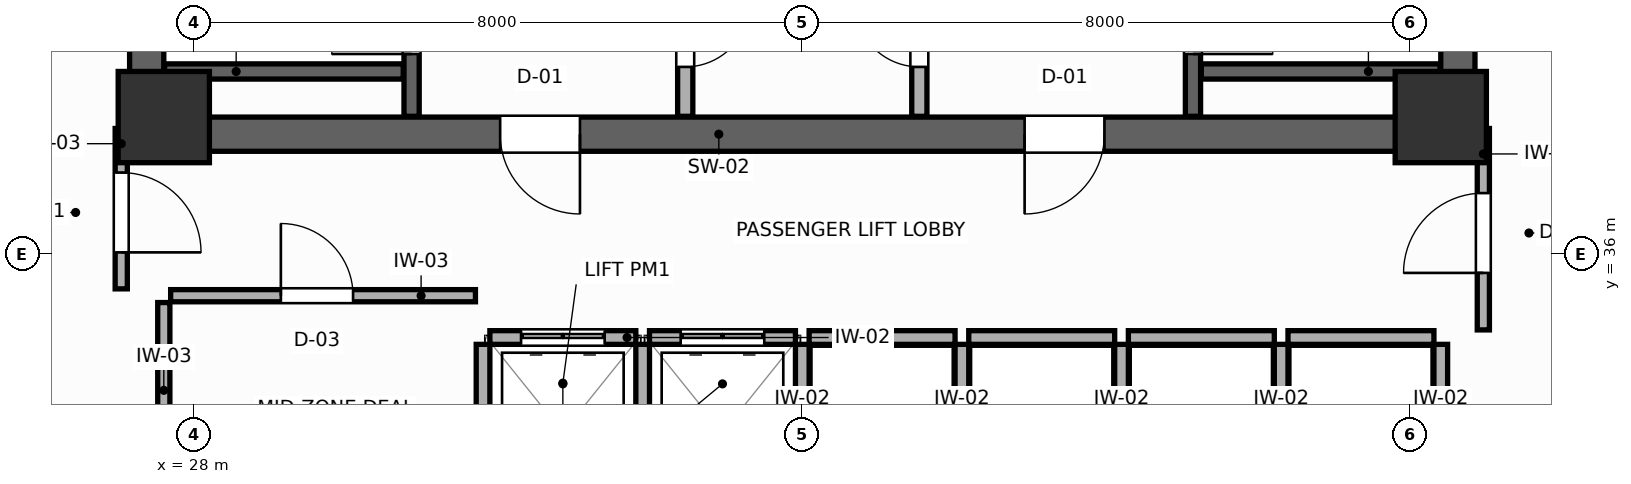
"""IFC4 building model, lengths in metres.
Left out: names, types, materials, properties, quantities, classifications, styles, units other than length and angle.
Written with IfcOpenShell. Run it as: python <this file> out.ifc"""

import sys

from ifc_helpers import new_model, si_unit, direction, frame, frame_2d, origin, origin_2d, place, context, subcontext, project, spatial, rectangle, extrude, source, transform, mapped, element, fill, save


model = new_model("IFC4")
c1 = context("Model", 3, precision=1e-05, world=origin(), true_north=direction((0.0, 1.0)))
c2 = subcontext(c1, "Body", "Model", "MODEL_VIEW")
j1 = project(units=[si_unit("LENGTHUNIT", "METRE"), si_unit("PLANEANGLEUNIT", "RADIAN")], contexts=[c1])
p1 = place(None, origin())
s1 = spatial("IfcSite", under=j1, at=p1, CompositionType="ELEMENT")
p2 = place(p1, origin())
s2 = spatial("IfcBuilding", under=s1, at=p2, CompositionType="ELEMENT")
p3 = place(p2, frame((0.0, 0.0, 136.2)))
s3 = spatial("IfcBuildingStorey", under=s2, at=p3, CompositionType="ELEMENT", Elevation=136.2)
p4 = place(p3, frame((27.15, 37.575, 0.0), z_axis=(0.0, 0.0, 1.0), x_axis=(1.0, 0.0, 0.0)))
e1 = element("IfcWall", 1, at=p4, inside=s3, PredefinedType="SHEAR", context=c2, shape_type="SweptSolid", body=[
    extrude(rectangle(XDim=17.7, YDim=0.45, at=frame_2d((8.85, 0.0))), origin(), (0.0, 0.0, 1.0), 3.6),
])
p5 = place(p4, frame((4.875, 0.0, 0.0)))
e2 = element("IfcOpeningElement", 2, at=p5, cuts=e1, PredefinedType="OPENING", context=c2, shape_type="SweptSolid", body=[
    extrude(rectangle(XDim=1.05, YDim=2.1, at=frame_2d((0.525, 1.05))), frame((0.0, 0.235, 0.0), z_axis=(0.0, -1.0, 0.0), x_axis=(1.0, 0.0, 0.0)), (0.0, 0.0, 1.0), 0.47),
])
p6 = place(p4, frame((11.775, 0.0, 0.0)))
e3 = element("IfcOpeningElement", 3, at=p6, cuts=e1, PredefinedType="OPENING", context=c2, shape_type="SweptSolid", body=[
    extrude(rectangle(XDim=1.05, YDim=2.1, at=frame_2d((0.525, 1.05))), frame((0.0, 0.235, 0.0), z_axis=(0.0, -1.0, 0.0), x_axis=(1.0, 0.0, 0.0)), (0.0, 0.0, 1.0), 0.47),
])
for number, where, z_axis, x_axis in (
    (4, (27.375, 37.8, 0.0), (0.0, 0.0, 1.0), (0.0, 1.0, 0.0)),
    (5, (44.625, 37.8, 0.0), (0.0, 0.0, 1.0), (0.0, 1.0, 0.0)),
):
    element("IfcWall", number, at=place(p3, frame(where, z_axis=z_axis, x_axis=x_axis)), inside=s3, PredefinedType="SHEAR", context=c2, shape_type="SweptSolid", body=[
        extrude(rectangle(XDim=9.0, YDim=0.45, at=frame_2d((4.5, 0.0))), origin(), (0.0, 0.0, 1.0), 3.6),
    ])
m1 = source(origin(), c2, "Body", "SweptSolid", [
    extrude(rectangle(XDim=1.2, YDim=1.2, at=origin_2d()), origin(), (0.0, 0.0, 1.0), 3.6),
])
for number, where, z_axis, x_axis in (
    (6, (27.6, 37.8, 0.0), (0.0, 0.0, 1.0), (1.0, 0.0, 0.0)),
    (7, (44.4, 37.8, 0.0), (0.0, 0.0, 1.0), (1.0, 0.0, 0.0)),
):
    element("IfcColumn", number, at=place(p3, frame(where, z_axis=z_axis, x_axis=x_axis)), inside=s3, PredefinedType="COLUMN", context=c2, shape_type="MappedRepresentation", body=[
        mapped(m1, transform((0.0, 0.0, 0.0), scale=1.0)),
    ])
p7 = place(p3, frame((30.86, 37.81, 0.0), z_axis=(0.0, 0.0, 1.0), x_axis=(0.0, 1.0, 0.0)))
e8 = element("IfcWall", 8, at=p7, inside=s3, PredefinedType="SHEAR", context=c2, shape_type="SweptSolid", body=[
    extrude(rectangle(XDim=8.98, YDim=0.2, at=frame_2d((4.49, 0.0))), origin(), (0.0, 0.0, 1.0), 3.6),
])
p8 = place(p7, frame((0.82, 0.0, 0.0)))
e9 = element("IfcOpeningElement", 9, at=p8, cuts=e8, PredefinedType="OPENING", context=c2, shape_type="SweptSolid", body=[
    extrude(rectangle(XDim=1.05, YDim=2.1, at=frame_2d((0.525, 1.05))), frame((0.0, 0.11, 0.0), z_axis=(0.0, -1.0, 0.0), x_axis=(1.0, 0.0, 0.0)), (0.0, 0.0, 1.0), 0.22),
])
p9 = place(p3, frame((27.61, 38.4, 0.0), z_axis=(0.0, 0.0, 1.0), x_axis=(1.0, 0.0, 0.0)))
e10 = element("IfcWall", 10, at=p9, inside=s3, PredefinedType="SHEAR", context=c2, shape_type="SweptSolid", body=[
    extrude(rectangle(XDim=3.14, YDim=0.2, at=frame_2d((1.57, 0.0))), origin(), (0.0, 0.0, 1.0), 3.6),
])
p10 = place(p3, frame((41.14, 37.81, 0.0), z_axis=(0.0, 0.0, 1.0), x_axis=(0.0, 1.0, 0.0)))
e11 = element("IfcWall", 11, at=p10, inside=s3, PredefinedType="SHEAR", context=c2, shape_type="SweptSolid", body=[
    extrude(rectangle(XDim=8.98, YDim=0.2, at=frame_2d((4.49, 0.0))), origin(), (0.0, 0.0, 1.0), 3.6),
])
p11 = place(p10, frame((0.82, 0.0, 0.0)))
e12 = element("IfcOpeningElement", 12, at=p11, cuts=e11, PredefinedType="OPENING", context=c2, shape_type="SweptSolid", body=[
    extrude(rectangle(XDim=1.05, YDim=2.1, at=frame_2d((0.525, 1.05))), frame((0.0, 0.11, 0.0), z_axis=(0.0, -1.0, 0.0), x_axis=(1.0, 0.0, 0.0)), (0.0, 0.0, 1.0), 0.22),
])
p12 = place(p3, frame((41.25, 38.4, 0.0), z_axis=(0.0, 0.0, 1.0), x_axis=(1.0, 0.0, 0.0)))
e13 = element("IfcWall", 13, at=p12, inside=s3, PredefinedType="SHEAR", context=c2, shape_type="SweptSolid", body=[
    extrude(rectangle(XDim=3.14, YDim=0.2, at=frame_2d((1.57, 0.0))), origin(), (0.0, 0.0, 1.0), 3.6),
])
p13 = place(p3, frame((34.46, 37.81, 0.0), z_axis=(0.0, 0.0, 1.0), x_axis=(0.0, 1.0, 0.0)))
e14 = element("IfcWall", 14, at=p13, inside=s3, PredefinedType="PARTITIONING", context=c2, shape_type="SweptSolid", body=[
    extrude(rectangle(XDim=8.98, YDim=0.2, at=frame_2d((4.49, 0.0))), origin(), (0.0, 0.0, 1.0), 3.4),
])
p14 = place(p13, frame((0.65, 0.0, 0.0)))
e15 = element("IfcOpeningElement", 15, at=p14, cuts=e14, PredefinedType="OPENING", context=c2, shape_type="SweptSolid", body=[
    extrude(rectangle(XDim=0.85, YDim=2.05, at=frame_2d((0.425, 1.025))), frame((0.0, 0.11, 0.0), z_axis=(0.0, -1.0, 0.0), x_axis=(1.0, 0.0, 0.0)), (0.0, 0.0, 1.0), 0.22),
])
p15 = place(p3, frame((37.54, 37.81, 0.0), z_axis=(0.0, 0.0, 1.0), x_axis=(0.0, 1.0, 0.0)))
e16 = element("IfcWall", 16, at=p15, inside=s3, PredefinedType="PARTITIONING", context=c2, shape_type="SweptSolid", body=[
    extrude(rectangle(XDim=8.98, YDim=0.2, at=frame_2d((4.49, 0.0))), origin(), (0.0, 0.0, 1.0), 3.4),
])
p16 = place(p15, frame((0.65, 0.0, 0.0)))
e17 = element("IfcOpeningElement", 17, at=p16, cuts=e16, PredefinedType="OPENING", context=c2, shape_type="SweptSolid", body=[
    extrude(rectangle(XDim=0.85, YDim=2.05, at=frame_2d((0.425, 1.025))), frame((0.0, 0.11, 0.0), z_axis=(0.0, -1.0, 0.0), x_axis=(1.0, 0.0, 0.0)), (0.0, 0.0, 1.0), 0.22),
])
p17 = place(p3, frame((31.89, 34.9, 0.0), z_axis=(0.0, 0.0, 1.0), x_axis=(1.0, 0.0, 0.0)))
e18 = element("IfcWall", 18, at=p17, inside=s3, PredefinedType="PARTITIONING", context=c2, shape_type="SweptSolid", body=[
    extrude(rectangle(XDim=1.92, YDim=0.18, at=frame_2d((0.96, 0.0))), origin(), (0.0, 0.0, 1.0), 3.4),
])
p18 = place(p17, frame((0.41, 0.0, 0.0)))
e19 = element("IfcOpeningElement", 19, at=p18, cuts=e18, PredefinedType="OPENING", context=c2, shape_type="SweptSolid", body=[
    extrude(rectangle(XDim=1.1, YDim=2.1, at=frame_2d((0.55, 1.05))), frame((0.0, 0.1, 0.0), z_axis=(0.0, -1.0, 0.0), x_axis=(1.0, 0.0, 0.0)), (0.0, 0.0, 1.0), 0.2),
])
p19 = place(p3, frame((31.8, 32.49, 0.0), z_axis=(0.0, 0.0, 1.0), x_axis=(0.0, 1.0, 0.0)))
e20 = element("IfcWall", 20, at=p19, inside=s3, PredefinedType="PARTITIONING", context=c2, shape_type="SweptSolid", body=[
    extrude(rectangle(XDim=2.32, YDim=0.18, at=frame_2d((1.16, 0.0))), origin(), (0.0, 0.0, 1.0), 3.4),
])
p20 = place(p3, frame((33.99, 34.9, 0.0), z_axis=(0.0, 0.0, 1.0), x_axis=(1.0, 0.0, 0.0)))
e21 = element("IfcWall", 21, at=p20, inside=s3, PredefinedType="PARTITIONING", context=c2, shape_type="SweptSolid", body=[
    extrude(rectangle(XDim=1.92, YDim=0.18, at=frame_2d((0.96, 0.0))), origin(), (0.0, 0.0, 1.0), 3.4),
])
p21 = place(p20, frame((0.41, 0.0, 0.0)))
e22 = element("IfcOpeningElement", 22, at=p21, cuts=e21, PredefinedType="OPENING", context=c2, shape_type="SweptSolid", body=[
    extrude(rectangle(XDim=1.1, YDim=2.1, at=frame_2d((0.55, 1.05))), frame((0.0, 0.1, 0.0), z_axis=(0.0, -1.0, 0.0), x_axis=(1.0, 0.0, 0.0)), (0.0, 0.0, 1.0), 0.2),
])
p22 = place(p3, frame((33.9, 32.49, 0.0), z_axis=(0.0, 0.0, 1.0), x_axis=(0.0, 1.0, 0.0)))
e23 = element("IfcWall", 23, at=p22, inside=s3, PredefinedType="PARTITIONING", context=c2, shape_type="SweptSolid", body=[
    extrude(rectangle(XDim=2.32, YDim=0.18, at=frame_2d((1.16, 0.0))), origin(), (0.0, 0.0, 1.0), 3.4),
])
p23 = place(p3, frame((36.09, 34.9, 0.0), z_axis=(0.0, 0.0, 1.0), x_axis=(1.0, 0.0, 0.0)))
e24 = element("IfcWall", 24, at=p23, inside=s3, PredefinedType="PARTITIONING", context=c2, shape_type="SweptSolid", body=[
    extrude(rectangle(XDim=1.92, YDim=0.18, at=frame_2d((0.96, 0.0))), origin(), (0.0, 0.0, 1.0), 3.4),
])
p24 = place(p3, frame((36.0, 32.49, 0.0), z_axis=(0.0, 0.0, 1.0), x_axis=(0.0, 1.0, 0.0)))
e25 = element("IfcWall", 25, at=p24, inside=s3, PredefinedType="PARTITIONING", context=c2, shape_type="SweptSolid", body=[
    extrude(rectangle(XDim=2.32, YDim=0.18, at=frame_2d((1.16, 0.0))), origin(), (0.0, 0.0, 1.0), 3.4),
])
p25 = place(p3, frame((38.19, 34.9, 0.0), z_axis=(0.0, 0.0, 1.0), x_axis=(1.0, 0.0, 0.0)))
e26 = element("IfcWall", 26, at=p25, inside=s3, PredefinedType="PARTITIONING", context=c2, shape_type="SweptSolid", body=[
    extrude(rectangle(XDim=1.92, YDim=0.18, at=frame_2d((0.96, 0.0))), origin(), (0.0, 0.0, 1.0), 3.4),
])
p26 = place(p3, frame((38.1, 32.49, 0.0), z_axis=(0.0, 0.0, 1.0), x_axis=(0.0, 1.0, 0.0)))
e27 = element("IfcWall", 27, at=p26, inside=s3, PredefinedType="PARTITIONING", context=c2, shape_type="SweptSolid", body=[
    extrude(rectangle(XDim=2.32, YDim=0.18, at=frame_2d((1.16, 0.0))), origin(), (0.0, 0.0, 1.0), 3.4),
])
p27 = place(p3, frame((40.29, 34.9, 0.0), z_axis=(0.0, 0.0, 1.0), x_axis=(1.0, 0.0, 0.0)))
e28 = element("IfcWall", 28, at=p27, inside=s3, PredefinedType="PARTITIONING", context=c2, shape_type="SweptSolid", body=[
    extrude(rectangle(XDim=1.92, YDim=0.18, at=frame_2d((0.96, 0.0))), origin(), (0.0, 0.0, 1.0), 3.4),
])
p28 = place(p3, frame((40.2, 32.49, 0.0), z_axis=(0.0, 0.0, 1.0), x_axis=(0.0, 1.0, 0.0)))
e29 = element("IfcWall", 29, at=p28, inside=s3, PredefinedType="PARTITIONING", context=c2, shape_type="SweptSolid", body=[
    extrude(rectangle(XDim=2.32, YDim=0.18, at=frame_2d((1.16, 0.0))), origin(), (0.0, 0.0, 1.0), 3.4),
])
p29 = place(p3, frame((42.39, 34.9, 0.0), z_axis=(0.0, 0.0, 1.0), x_axis=(1.0, 0.0, 0.0)))
e30 = element("IfcWall", 30, at=p29, inside=s3, PredefinedType="PARTITIONING", context=c2, shape_type="SweptSolid", body=[
    extrude(rectangle(XDim=1.92, YDim=0.18, at=frame_2d((0.96, 0.0))), origin(), (0.0, 0.0, 1.0), 3.4),
])
for number, where, z_axis, x_axis in (
    (31, (42.3, 32.49, 0.0), (0.0, 0.0, 1.0), (0.0, 1.0, 0.0)),
    (32, (44.4, 32.49, 0.0), (0.0, 0.0, 1.0), (0.0, 1.0, 0.0)),
):
    element("IfcWall", number, at=place(p3, frame(where, z_axis=z_axis, x_axis=x_axis)), inside=s3, PredefinedType="PARTITIONING", context=c2, shape_type="SweptSolid", body=[
        extrude(rectangle(XDim=2.32, YDim=0.18, at=frame_2d((1.16, 0.0))), origin(), (0.0, 0.0, 1.0), 3.4),
    ])
p30 = place(p3, frame((27.6, 33.05, 0.0), z_axis=(0.0, 0.0, 1.0), x_axis=(0.0, 1.0, 0.0)))
e33 = element("IfcWall", 33, at=p30, inside=s3, PredefinedType="PARTITIONING", context=c2, shape_type="SweptSolid", body=[
    extrude(rectangle(XDim=2.31, YDim=0.16, at=frame_2d((1.155, 0.0))), origin(), (0.0, 0.0, 1.0), 3.4),
])
p31 = place(p3, frame((27.69, 35.45, 0.0), z_axis=(0.0, 0.0, 1.0), x_axis=(1.0, 0.0, 0.0)))
e34 = element("IfcWall", 34, at=p31, inside=s3, PredefinedType="PARTITIONING", context=c2, shape_type="SweptSolid", body=[
    extrude(rectangle(XDim=4.01, YDim=0.16, at=frame_2d((2.005, 0.0))), origin(), (0.0, 0.0, 1.0), 3.4),
])
p32 = place(p31, frame((1.45, 0.0, 0.0)))
e35 = element("IfcOpeningElement", 35, at=p32, cuts=e34, PredefinedType="OPENING", context=c2, shape_type="SweptSolid", body=[
    extrude(rectangle(XDim=0.95, YDim=2.05, at=frame_2d((0.475, 1.025))), frame((0.0, 0.09, 0.0), z_axis=(0.0, -1.0, 0.0), x_axis=(1.0, 0.0, 0.0)), (0.0, 0.0, 1.0), 0.18),
])
p33 = place(p3, frame((27.04, 35.54, 0.0), z_axis=(0.0, 0.0, 1.0), x_axis=(0.0, 1.0, 0.0)))
e36 = element("IfcWall", 36, at=p33, inside=s3, PredefinedType="PARTITIONING", context=c2, shape_type="SweptSolid", body=[
    extrude(rectangle(XDim=2.11, YDim=0.16, at=frame_2d((1.055, 0.0))), origin(), (0.0, 0.0, 1.0), 3.4),
])
p34 = place(p33, frame((0.48, 0.0, 0.0)))
e37 = element("IfcOpeningElement", 37, at=p34, cuts=e36, PredefinedType="OPENING", context=c2, shape_type="SweptSolid", body=[
    extrude(rectangle(XDim=1.05, YDim=2.1, at=frame_2d((0.525, 1.05))), frame((0.0, 0.09, 0.0), z_axis=(0.0, -1.0, 0.0), x_axis=(1.0, 0.0, 0.0)), (0.0, 0.0, 1.0), 0.18),
])
p35 = place(p3, frame((44.96, 35.0, 0.0), z_axis=(0.0, 0.0, 1.0), x_axis=(0.0, 1.0, 0.0)))
e38 = element("IfcWall", 38, at=p35, inside=s3, PredefinedType="PARTITIONING", context=c2, shape_type="SweptSolid", body=[
    extrude(rectangle(XDim=2.65, YDim=0.16, at=frame_2d((1.325, 0.0))), origin(), (0.0, 0.0, 1.0), 3.4),
])
p36 = place(p35, frame((0.75, 0.0, 0.0)))
e39 = element("IfcOpeningElement", 39, at=p36, cuts=e38, PredefinedType="OPENING", context=c2, shape_type="SweptSolid", body=[
    extrude(rectangle(XDim=1.05, YDim=2.1, at=frame_2d((0.525, 1.05))), frame((0.0, 0.09, 0.0), z_axis=(0.0, -1.0, 0.0), x_axis=(1.0, 0.0, 0.0)), (0.0, 0.0, 1.0), 0.18),
])
p37 = place(p8, origin())
e40 = element("IfcDoor", 40, at=p37, inside=s3, OperationType="SINGLE_SWING_LEFT", PredefinedType="DOOR", context=c2, shape_type="SweptSolid", body=[
    extrude(rectangle(XDim=1.05, YDim=2.1, at=frame_2d((0.525, 1.05))), frame((0.0, 0.025, 0.0), z_axis=(0.0, -1.0, 0.0), x_axis=(1.0, 0.0, 0.0)), (0.0, 0.0, 1.0), 0.05),
])
fill(e9, e40)
p38 = place(p11, frame((1.05, 0.0, 0.0), z_axis=(0.0, 0.0, 1.0), x_axis=(-1.0, 0.0, 0.0)))
e41 = element("IfcDoor", 41, at=p38, inside=s3, OperationType="SINGLE_SWING_RIGHT", PredefinedType="DOOR", context=c2, shape_type="SweptSolid", body=[
    extrude(rectangle(XDim=1.05, YDim=2.1, at=frame_2d((0.525, 1.05))), frame((0.0, 0.025, 0.0), z_axis=(0.0, -1.0, 0.0), x_axis=(1.0, 0.0, 0.0)), (0.0, 0.0, 1.0), 0.05),
])
fill(e12, e41)
p39 = place(p14, frame((0.85, 0.0, 0.0), z_axis=(0.0, 0.0, 1.0), x_axis=(-1.0, 0.0, 0.0)))
e42 = element("IfcDoor", 42, at=p39, inside=s3, OperationType="SINGLE_SWING_LEFT", PredefinedType="DOOR", context=c2, shape_type="SweptSolid", body=[
    extrude(rectangle(XDim=0.85, YDim=2.05, at=frame_2d((0.425, 1.025))), frame((0.0, 0.025, 0.0), z_axis=(0.0, -1.0, 0.0), x_axis=(1.0, 0.0, 0.0)), (0.0, 0.0, 1.0), 0.05),
])
fill(e15, e42)
p40 = place(p16, origin())
e43 = element("IfcDoor", 43, at=p40, inside=s3, OperationType="SINGLE_SWING_RIGHT", PredefinedType="DOOR", context=c2, shape_type="SweptSolid", body=[
    extrude(rectangle(XDim=0.85, YDim=2.05, at=frame_2d((0.425, 1.025))), frame((0.0, 0.025, 0.0), z_axis=(0.0, -1.0, 0.0), x_axis=(1.0, 0.0, 0.0)), (0.0, 0.0, 1.0), 0.05),
])
fill(e17, e43)
p41 = place(p18, origin())
e44 = element("IfcDoor", 44, at=p41, inside=s3, OperationType="DOUBLE_DOOR_SLIDING", PredefinedType="DOOR", context=c2, shape_type="SweptSolid", body=[
    extrude(rectangle(XDim=1.1, YDim=2.1, at=frame_2d((0.55, 1.05))), frame((0.0, 0.025, 0.0), z_axis=(0.0, -1.0, 0.0), x_axis=(1.0, 0.0, 0.0)), (0.0, 0.0, 1.0), 0.05),
])
fill(e19, e44)
p42 = place(p21, origin())
e45 = element("IfcDoor", 45, at=p42, inside=s3, OperationType="DOUBLE_DOOR_SLIDING", PredefinedType="DOOR", context=c2, shape_type="SweptSolid", body=[
    extrude(rectangle(XDim=1.1, YDim=2.1, at=frame_2d((0.55, 1.05))), frame((0.0, 0.025, 0.0), z_axis=(0.0, -1.0, 0.0), x_axis=(1.0, 0.0, 0.0)), (0.0, 0.0, 1.0), 0.05),
])
fill(e22, e45)
p43 = place(p32, origin())
e46 = element("IfcDoor", 46, at=p43, inside=s3, OperationType="SINGLE_SWING_LEFT", PredefinedType="DOOR", context=c2, shape_type="SweptSolid", body=[
    extrude(rectangle(XDim=0.95, YDim=2.05, at=frame_2d((0.475, 1.025))), frame((0.0, 0.025, 0.0), z_axis=(0.0, -1.0, 0.0), x_axis=(1.0, 0.0, 0.0)), (0.0, 0.0, 1.0), 0.05),
])
fill(e35, e46)
p44 = place(p34, frame((1.05, 0.0, 0.0), z_axis=(0.0, 0.0, 1.0), x_axis=(-1.0, 0.0, 0.0)))
e47 = element("IfcDoor", 47, at=p44, inside=s3, OperationType="SINGLE_SWING_RIGHT", PredefinedType="DOOR", context=c2, shape_type="SweptSolid", body=[
    extrude(rectangle(XDim=1.05, YDim=2.1, at=frame_2d((0.525, 1.05))), frame((0.0, 0.025, 0.0), z_axis=(0.0, -1.0, 0.0), x_axis=(1.0, 0.0, 0.0)), (0.0, 0.0, 1.0), 0.05),
])
fill(e37, e47)
p45 = place(p36, origin())
e48 = element("IfcDoor", 48, at=p45, inside=s3, OperationType="SINGLE_SWING_LEFT", PredefinedType="DOOR", context=c2, shape_type="SweptSolid", body=[
    extrude(rectangle(XDim=1.05, YDim=2.1, at=frame_2d((0.525, 1.05))), frame((0.0, 0.025, 0.0), z_axis=(0.0, -1.0, 0.0), x_axis=(1.0, 0.0, 0.0)), (0.0, 0.0, 1.0), 0.05),
])
fill(e39, e48)
p46 = place(p5, frame((1.05, 0.0, 0.0), z_axis=(0.0, 0.0, 1.0), x_axis=(-1.0, 0.0, 0.0)))
e49 = element("IfcDoor", 49, at=p46, inside=s3, OperationType="SINGLE_SWING_LEFT", PredefinedType="DOOR", context=c2, shape_type="SweptSolid", body=[
    extrude(rectangle(XDim=1.05, YDim=2.1, at=frame_2d((0.525, 1.05))), frame((0.0, 0.025, 0.0), z_axis=(0.0, -1.0, 0.0), x_axis=(1.0, 0.0, 0.0)), (0.0, 0.0, 1.0), 0.05),
])
fill(e2, e49)
p47 = place(p6, frame((1.05, 0.0, 0.0), z_axis=(0.0, 0.0, 1.0), x_axis=(-1.0, 0.0, 0.0)))
e50 = element("IfcDoor", 50, at=p47, inside=s3, OperationType="SINGLE_SWING_RIGHT", PredefinedType="DOOR", context=c2, shape_type="SweptSolid", body=[
    extrude(rectangle(XDim=1.05, YDim=2.1, at=frame_2d((0.525, 1.05))), frame((0.0, 0.025, 0.0), z_axis=(0.0, -1.0, 0.0), x_axis=(1.0, 0.0, 0.0)), (0.0, 0.0, 1.0), 0.05),
])
fill(e3, e50)
save(model, sys.argv[1])
